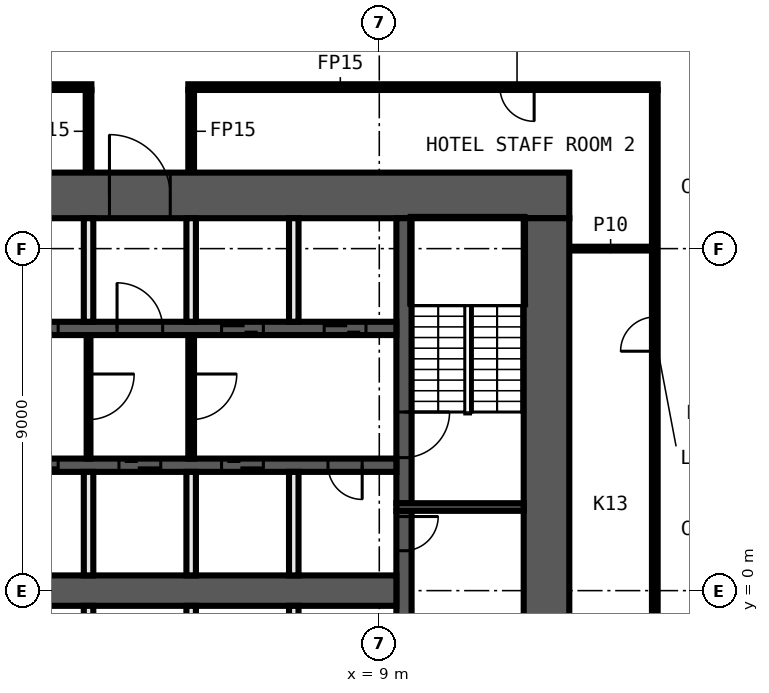
"""IFC4 building model, lengths in metres.
Left out: names, types, materials, properties, quantities, classifications, styles, units other than length and angle.
Written with IfcOpenShell. Run it as: python <this file> out.ifc"""

import sys

from ifc_helpers import new_model, si_unit, direction, frame, frame_2d, origin, place, context, subcontext, project, spatial, rectangle, extrude, element, fill, save


model = new_model("IFC4")
c1 = context("Model", 3, precision=1e-05, world=origin(), true_north=direction((0.0, 1.0)))
c2 = subcontext(c1, "Body", "Model", "MODEL_VIEW")
j1 = project(units=[si_unit("LENGTHUNIT", "METRE"), si_unit("PLANEANGLEUNIT", "RADIAN")], contexts=[c1])
p1 = place(None, origin())
s1 = spatial("IfcSite", under=j1, at=p1, CompositionType="ELEMENT")
p2 = place(p1, origin())
s2 = spatial("IfcBuilding", under=s1, at=p2, CompositionType="ELEMENT")
p3 = place(p2, frame((0.0, 0.0, 62.5)))
s3 = spatial("IfcBuildingStorey", under=s2, at=p3, CompositionType="ELEMENT", Elevation=62.5)
p4 = place(p3, frame((14.0, 9.0, 0.0), z_axis=(0.0, 0.0, 1.0), x_axis=(1.0, 0.0, 0.0)))
e1 = element("IfcWall", 1, at=p4, inside=s3, PredefinedType="PARTITIONING", context=c2, shape_type="SweptSolid", body=[
    extrude(rectangle(XDim=2.175, YDim=0.1, at=frame_2d((1.087, 0.0))), origin(), (0.0, 0.0, 1.0), 3.3),
])
p5 = place(p3, frame((1.425, 13.25, 0.0), z_axis=(0.0, 0.0, 1.0), x_axis=(-1.0, 0.0, 0.0)))
e2 = element("IfcWall", 2, at=p5, inside=s3, PredefinedType="PARTITIONING", context=c2, shape_type="SweptSolid", body=[
    extrude(rectangle(XDim=17.75, YDim=0.15, at=frame_2d((8.875, 0.0))), origin(), (0.0, 0.0, 1.0), 3.3),
])
p6 = place(p5, frame((7.725, 0.0, 0.0)))
e3 = element("IfcOpeningElement", 3, at=p6, cuts=e2, PredefinedType="OPENING", context=c2, shape_type="SweptSolid", body=[
    extrude(rectangle(XDim=0.9, YDim=2.1, at=frame_2d((0.45, 1.05))), frame((0.0, 0.085, 0.0), z_axis=(0.0, -1.0, 0.0), x_axis=(1.0, 0.0, 0.0)), (0.0, 0.0, 1.0), 0.17),
])
p7 = place(p5, frame((13.6, 0.0, 0.0)))
e4 = element("IfcOpeningElement", 4, at=p7, cuts=e2, PredefinedType="OPENING", context=c2, shape_type="SweptSolid", body=[
    extrude(rectangle(XDim=0.9, YDim=2.1, at=frame_2d((0.45, 1.05))), frame((0.0, 0.085, 0.0), z_axis=(0.0, -1.0, 0.0), x_axis=(1.0, 0.0, 0.0)), (0.0, 0.0, 1.0), 0.17),
])
p8 = place(p3, frame((16.325, 13.25, 0.0), z_axis=(0.0, 0.0, 1.0), x_axis=(-1.0, 0.0, 0.0)))
e5 = element("IfcWall", 5, at=p8, inside=s3, PredefinedType="PARTITIONING", context=c2, shape_type="SweptSolid", body=[
    extrude(rectangle(XDim=12.35, YDim=0.15, at=frame_2d((6.175, 0.0))), origin(), (0.0, 0.0, 1.0), 3.3),
])
p9 = place(p8, frame((3.25, 0.0, 0.0)))
e6 = element("IfcOpeningElement", 6, at=p9, cuts=e5, PredefinedType="OPENING", context=c2, shape_type="SweptSolid", body=[
    extrude(rectangle(XDim=0.9, YDim=2.1, at=frame_2d((0.45, 1.05))), frame((0.0, 0.085, 0.0), z_axis=(0.0, -1.0, 0.0), x_axis=(1.0, 0.0, 0.0)), (0.0, 0.0, 1.0), 0.17),
])
p10 = place(p3, frame((16.25, -13.175, 0.0), z_axis=(0.0, 0.0, 1.0), x_axis=(0.0, 1.0, 0.0)))
e7 = element("IfcWall", 7, at=p10, inside=s3, PredefinedType="PARTITIONING", context=c2, shape_type="SweptSolid", body=[
    extrude(rectangle(XDim=26.35, YDim=0.15, at=frame_2d((13.175, 0.0))), origin(), (0.0, 0.0, 1.0), 3.3),
])
p11 = place(p10, frame((19.475, 0.0, 0.0)))
e8 = element("IfcOpeningElement", 8, at=p11, cuts=e7, PredefinedType="OPENING", context=c2, shape_type="SweptSolid", body=[
    extrude(rectangle(XDim=0.9, YDim=2.1, at=frame_2d((0.45, 1.05))), frame((0.0, 0.085, 0.0), z_axis=(0.0, -1.0, 0.0), x_axis=(1.0, 0.0, 0.0)), (0.0, 0.0, 1.0), 0.17),
])
for number, where, z_axis, x_axis in (
    (9, (4.05, 11.0, 0.0), (0.0, 0.0, 1.0), (0.0, 1.0, 0.0)),
    (10, (1.35, 11.0, 0.0), (0.0, 0.0, 1.0), (0.0, 1.0, 0.0)),
):
    element("IfcWall", number, at=place(p3, frame(where, z_axis=z_axis, x_axis=x_axis)), inside=s3, PredefinedType="PARTITIONING", context=c2, shape_type="SweptSolid", body=[
        extrude(rectangle(XDim=2.175, YDim=0.15, at=frame_2d((1.087, 0.0))), origin(), (0.0, 0.0, 1.0), 3.3),
    ])
p12 = place(p3, frame((-14.0, 10.4, 0.0), z_axis=(0.0, 0.0, 1.0), x_axis=(1.0, 0.0, 0.0)))
e11 = element("IfcWall", 11, at=p12, inside=s3, PredefinedType="SHEAR", context=c2, shape_type="SweptSolid", body=[
    extrude(rectangle(XDim=28.0, YDim=1.2, at=frame_2d((14.0, 0.0))), origin(), (0.0, 0.0, 1.0), 3.3),
])
p13 = place(p12, frame((15.9, 0.0, 0.0)))
e12 = element("IfcOpeningElement", 12, at=p13, cuts=e11, PredefinedType="OPENING", context=c2, shape_type="SweptSolid", body=[
    extrude(rectangle(XDim=1.6, YDim=2.1, at=frame_2d((0.8, 1.05))), frame((0.0, 0.61, 0.0), z_axis=(0.0, -1.0, 0.0), x_axis=(1.0, 0.0, 0.0)), (0.0, 0.0, 1.0), 1.22),
])
p14 = place(p3, frame((13.4, 9.8, 0.0), z_axis=(0.0, 0.0, 1.0), x_axis=(0.0, -1.0, 0.0)))
e13 = element("IfcWall", 13, at=p14, inside=s3, PredefinedType="SHEAR", context=c2, shape_type="SweptSolid", body=[
    extrude(rectangle(XDim=19.6, YDim=1.2, at=frame_2d((9.8, 0.0))), origin(), (0.0, 0.0, 1.0), 3.3),
])
p15 = place(p3, frame((9.65, 2.1, 0.0), z_axis=(0.0, 0.0, 1.0), x_axis=(0.0, -1.0, 0.0)))
e14 = element("IfcWall", 14, at=p15, inside=s3, PredefinedType="SHEAR", context=c2, shape_type="SweptSolid", body=[
    extrude(rectangle(XDim=4.2, YDim=0.4, at=frame_2d((2.1, 0.0))), origin(), (0.0, 0.0, 1.0), 3.3),
])
p16 = place(p15, frame((0.15, 0.0, 0.0)))
e15 = element("IfcOpeningElement", 15, at=p16, cuts=e14, PredefinedType="OPENING", context=c2, shape_type="SweptSolid", body=[
    extrude(rectangle(XDim=0.9, YDim=2.1, at=frame_2d((0.45, 1.05))), frame((0.0, 0.21, 0.0), z_axis=(0.0, -1.0, 0.0), x_axis=(1.0, 0.0, 0.0)), (0.0, 0.0, 1.0), 0.42),
])
p17 = place(p3, frame((9.65, 9.8, 0.0), z_axis=(0.0, 0.0, 1.0), x_axis=(0.0, -1.0, 0.0)))
e16 = element("IfcWall", 16, at=p17, inside=s3, PredefinedType="SHEAR", context=c2, shape_type="SweptSolid", body=[
    extrude(rectangle(XDim=7.5, YDim=0.4, at=frame_2d((3.75, 0.0))), origin(), (0.0, 0.0, 1.0), 3.3),
])
p18 = place(p17, frame((5.1, 0.0, 0.0)))
e17 = element("IfcOpeningElement", 17, at=p18, cuts=e16, PredefinedType="OPENING", context=c2, shape_type="SweptSolid", body=[
    extrude(rectangle(XDim=1.2, YDim=2.1, at=frame_2d((0.6, 1.05))), frame((0.0, 0.21, 0.0), z_axis=(0.0, -1.0, 0.0), x_axis=(1.0, 0.0, 0.0)), (0.0, 0.0, 1.0), 0.42),
])
p19 = place(p3, frame((9.45, 2.2, 0.0), z_axis=(0.0, 0.0, 1.0), x_axis=(1.0, 0.0, 0.0)))
e18 = element("IfcWall", 18, at=p19, inside=s3, PredefinedType="SHEAR", context=c2, shape_type="SweptSolid", body=[
    extrude(rectangle(XDim=3.35, YDim=0.2, at=frame_2d((1.675, 0.0))), origin(), (0.0, 0.0, 1.0), 3.3),
])
p20 = place(p3, frame((-9.45, 6.9, 0.0), z_axis=(0.0, 0.0, 1.0), x_axis=(1.0, 0.0, 0.0)))
e19 = element("IfcWall", 19, at=p20, inside=s3, PredefinedType="SHEAR", context=c2, shape_type="SweptSolid", body=[
    extrude(rectangle(XDim=18.9, YDim=0.35, at=frame_2d((9.45, 0.0))), origin(), (0.0, 0.0, 1.0), 3.3),
])
p21 = place(p20, frame((0.8, 0.0, 0.0)))
e20 = element("IfcOpeningElement", 20, at=p21, cuts=e19, PredefinedType="OPENING", context=c2, shape_type="SweptSolid", body=[
    extrude(rectangle(XDim=1.1, YDim=2.1, at=frame_2d((0.55, 1.05))), frame((0.0, 0.185, 0.0), z_axis=(0.0, -1.0, 0.0), x_axis=(1.0, 0.0, 0.0)), (0.0, 0.0, 1.0), 0.37),
])
p22 = place(p20, frame((3.5, 0.0, 0.0)))
e21 = element("IfcOpeningElement", 21, at=p22, cuts=e19, PredefinedType="OPENING", context=c2, shape_type="SweptSolid", body=[
    extrude(rectangle(XDim=1.1, YDim=2.1, at=frame_2d((0.55, 1.05))), frame((0.0, 0.185, 0.0), z_axis=(0.0, -1.0, 0.0), x_axis=(1.0, 0.0, 0.0)), (0.0, 0.0, 1.0), 0.37),
])
p23 = place(p20, frame((6.2, 0.0, 0.0)))
e22 = element("IfcOpeningElement", 22, at=p23, cuts=e19, PredefinedType="OPENING", context=c2, shape_type="SweptSolid", body=[
    extrude(rectangle(XDim=1.1, YDim=2.1, at=frame_2d((0.55, 1.05))), frame((0.0, 0.185, 0.0), z_axis=(0.0, -1.0, 0.0), x_axis=(1.0, 0.0, 0.0)), (0.0, 0.0, 1.0), 0.37),
])
p24 = place(p20, frame((8.9, 0.0, 0.0)))
e23 = element("IfcOpeningElement", 23, at=p24, cuts=e19, PredefinedType="OPENING", context=c2, shape_type="SweptSolid", body=[
    extrude(rectangle(XDim=1.1, YDim=2.1, at=frame_2d((0.55, 1.05))), frame((0.0, 0.185, 0.0), z_axis=(0.0, -1.0, 0.0), x_axis=(1.0, 0.0, 0.0)), (0.0, 0.0, 1.0), 0.37),
])
p25 = place(p20, frame((11.55, 0.0, 0.0)))
e24 = element("IfcOpeningElement", 24, at=p25, cuts=e19, PredefinedType="OPENING", context=c2, shape_type="SweptSolid", body=[
    extrude(rectangle(XDim=1.2, YDim=2.1, at=frame_2d((0.6, 1.05))), frame((0.0, 0.185, 0.0), z_axis=(0.0, -1.0, 0.0), x_axis=(1.0, 0.0, 0.0)), (0.0, 0.0, 1.0), 0.37),
])
p26 = place(p20, frame((14.3, 0.0, 0.0)))
e25 = element("IfcOpeningElement", 25, at=p26, cuts=e19, PredefinedType="OPENING", context=c2, shape_type="SweptSolid", body=[
    extrude(rectangle(XDim=1.1, YDim=2.1, at=frame_2d((0.55, 1.05))), frame((0.0, 0.185, 0.0), z_axis=(0.0, -1.0, 0.0), x_axis=(1.0, 0.0, 0.0)), (0.0, 0.0, 1.0), 0.37),
])
p27 = place(p20, frame((17.0, 0.0, 0.0)))
e26 = element("IfcOpeningElement", 26, at=p27, cuts=e19, PredefinedType="OPENING", context=c2, shape_type="SweptSolid", body=[
    extrude(rectangle(XDim=1.1, YDim=2.1, at=frame_2d((0.55, 1.05))), frame((0.0, 0.185, 0.0), z_axis=(0.0, -1.0, 0.0), x_axis=(1.0, 0.0, 0.0)), (0.0, 0.0, 1.0), 0.37),
])
p28 = place(p3, frame((9.45, 3.3, 0.0), z_axis=(0.0, 0.0, 1.0), x_axis=(-1.0, 0.0, 0.0)))
e27 = element("IfcWall", 27, at=p28, inside=s3, PredefinedType="SHEAR", context=c2, shape_type="SweptSolid", body=[
    extrude(rectangle(XDim=18.9, YDim=0.35, at=frame_2d((9.45, 0.0))), origin(), (0.0, 0.0, 1.0), 3.3),
])
p29 = place(p28, frame((17.0, 0.0, 0.0)))
e28 = element("IfcOpeningElement", 28, at=p29, cuts=e27, PredefinedType="OPENING", context=c2, shape_type="SweptSolid", body=[
    extrude(rectangle(XDim=1.1, YDim=2.1, at=frame_2d((0.55, 1.05))), frame((0.0, 0.185, 0.0), z_axis=(0.0, -1.0, 0.0), x_axis=(1.0, 0.0, 0.0)), (0.0, 0.0, 1.0), 0.37),
])
p30 = place(p28, frame((14.3, 0.0, 0.0)))
e29 = element("IfcOpeningElement", 29, at=p30, cuts=e27, PredefinedType="OPENING", context=c2, shape_type="SweptSolid", body=[
    extrude(rectangle(XDim=1.1, YDim=2.1, at=frame_2d((0.55, 1.05))), frame((0.0, 0.185, 0.0), z_axis=(0.0, -1.0, 0.0), x_axis=(1.0, 0.0, 0.0)), (0.0, 0.0, 1.0), 0.37),
])
p31 = place(p28, frame((11.6, 0.0, 0.0)))
e30 = element("IfcOpeningElement", 30, at=p31, cuts=e27, PredefinedType="OPENING", context=c2, shape_type="SweptSolid", body=[
    extrude(rectangle(XDim=1.1, YDim=2.1, at=frame_2d((0.55, 1.05))), frame((0.0, 0.185, 0.0), z_axis=(0.0, -1.0, 0.0), x_axis=(1.0, 0.0, 0.0)), (0.0, 0.0, 1.0), 0.37),
])
p32 = place(p28, frame((8.9, 0.0, 0.0)))
e31 = element("IfcOpeningElement", 31, at=p32, cuts=e27, PredefinedType="OPENING", context=c2, shape_type="SweptSolid", body=[
    extrude(rectangle(XDim=1.1, YDim=2.1, at=frame_2d((0.55, 1.05))), frame((0.0, 0.185, 0.0), z_axis=(0.0, -1.0, 0.0), x_axis=(1.0, 0.0, 0.0)), (0.0, 0.0, 1.0), 0.37),
])
p33 = place(p28, frame((6.2, 0.0, 0.0)))
e32 = element("IfcOpeningElement", 32, at=p33, cuts=e27, PredefinedType="OPENING", context=c2, shape_type="SweptSolid", body=[
    extrude(rectangle(XDim=1.1, YDim=2.1, at=frame_2d((0.55, 1.05))), frame((0.0, 0.185, 0.0), z_axis=(0.0, -1.0, 0.0), x_axis=(1.0, 0.0, 0.0)), (0.0, 0.0, 1.0), 0.37),
])
p34 = place(p28, frame((3.5, 0.0, 0.0)))
e33 = element("IfcOpeningElement", 33, at=p34, cuts=e27, PredefinedType="OPENING", context=c2, shape_type="SweptSolid", body=[
    extrude(rectangle(XDim=1.1, YDim=2.1, at=frame_2d((0.55, 1.05))), frame((0.0, 0.185, 0.0), z_axis=(0.0, -1.0, 0.0), x_axis=(1.0, 0.0, 0.0)), (0.0, 0.0, 1.0), 0.37),
])
p35 = place(p28, frame((0.9, 0.0, 0.0)))
e34 = element("IfcOpeningElement", 34, at=p35, cuts=e27, PredefinedType="OPENING", context=c2, shape_type="SweptSolid", body=[
    extrude(rectangle(XDim=0.9, YDim=2.1, at=frame_2d((0.45, 1.05))), frame((0.0, 0.185, 0.0), z_axis=(0.0, -1.0, 0.0), x_axis=(1.0, 0.0, 0.0)), (0.0, 0.0, 1.0), 0.37),
])
p36 = place(p3, frame((-9.45, 0.0, 0.0), z_axis=(0.0, 0.0, 1.0), x_axis=(1.0, 0.0, 0.0)))
e35 = element("IfcWall", 35, at=p36, inside=s3, PredefinedType="SHEAR", context=c2, shape_type="SweptSolid", body=[
    extrude(rectangle(XDim=18.9, YDim=0.8, at=frame_2d((9.45, 0.0))), origin(), (0.0, 0.0, 1.0), 3.3),
])
for number, where, z_axis, x_axis in (
    (36, (6.75, -3.125, 0.0), (0.0, 0.0, 1.0), (0.0, 1.0, 0.0)),
    (37, (6.75, 0.4, 0.0), (0.0, 0.0, 1.0), (0.0, 1.0, 0.0)),
    (38, (6.75, 7.075, 0.0), (0.0, 0.0, 1.0), (0.0, 1.0, 0.0)),
):
    element("IfcWall", number, at=place(p3, frame(where, z_axis=z_axis, x_axis=x_axis)), inside=s3, PredefinedType="SOLIDWALL", context=c2, shape_type="SweptSolid", body=[
        extrude(rectangle(XDim=2.725, YDim=0.25, at=frame_2d((1.363, 0.0))), origin(), (0.0, 0.0, 1.0), 3.3),
    ])
p37 = place(p3, frame((4.05, 6.725, 0.0), z_axis=(0.0, 0.0, 1.0), x_axis=(0.0, -1.0, 0.0)))
e39 = element("IfcWall", 39, at=p37, inside=s3, PredefinedType="PARTITIONING", context=c2, shape_type="SweptSolid", body=[
    extrude(rectangle(XDim=3.25, YDim=0.15, at=frame_2d((1.625, 0.0))), origin(), (0.0, 0.0, 1.0), 3.3),
])
p38 = place(p37, frame((1.025, 0.0, 0.0)))
e40 = element("IfcOpeningElement", 40, at=p38, cuts=e39, PredefinedType="OPENING", context=c2, shape_type="SweptSolid", body=[
    extrude(rectangle(XDim=1.2, YDim=2.1, at=frame_2d((0.6, 1.05))), frame((0.0, 0.085, 0.0), z_axis=(0.0, -1.0, 0.0), x_axis=(1.0, 0.0, 0.0)), (0.0, 0.0, 1.0), 0.17),
])
for number, where, z_axis, x_axis in (
    (41, (4.05, -3.125, 0.0), (0.0, 0.0, 1.0), (0.0, 1.0, 0.0)),
    (42, (4.05, 0.4, 0.0), (0.0, 0.0, 1.0), (0.0, 1.0, 0.0)),
    (43, (4.05, 7.075, 0.0), (0.0, 0.0, 1.0), (0.0, 1.0, 0.0)),
):
    element("IfcWall", number, at=place(p3, frame(where, z_axis=z_axis, x_axis=x_axis)), inside=s3, PredefinedType="SOLIDWALL", context=c2, shape_type="SweptSolid", body=[
        extrude(rectangle(XDim=2.725, YDim=0.25, at=frame_2d((1.363, 0.0))), origin(), (0.0, 0.0, 1.0), 3.3),
    ])
p39 = place(p3, frame((1.35, 6.725, 0.0), z_axis=(0.0, 0.0, 1.0), x_axis=(0.0, -1.0, 0.0)))
e44 = element("IfcWall", 44, at=p39, inside=s3, PredefinedType="PARTITIONING", context=c2, shape_type="SweptSolid", body=[
    extrude(rectangle(XDim=3.25, YDim=0.1, at=frame_2d((1.625, 0.0))), origin(), (0.0, 0.0, 1.0), 3.3),
])
p40 = place(p39, frame((1.025, 0.0, 0.0)))
e45 = element("IfcOpeningElement", 45, at=p40, cuts=e44, PredefinedType="OPENING", context=c2, shape_type="SweptSolid", body=[
    extrude(rectangle(XDim=1.2, YDim=2.1, at=frame_2d((0.6, 1.05))), frame((0.0, 0.06, 0.0), z_axis=(0.0, -1.0, 0.0), x_axis=(1.0, 0.0, 0.0)), (0.0, 0.0, 1.0), 0.12),
])
for number, where, z_axis, x_axis in (
    (46, (1.35, -3.125, 0.0), (0.0, 0.0, 1.0), (0.0, 1.0, 0.0)),
    (47, (1.35, 0.4, 0.0), (0.0, 0.0, 1.0), (0.0, 1.0, 0.0)),
    (48, (1.35, 7.075, 0.0), (0.0, 0.0, 1.0), (0.0, 1.0, 0.0)),
):
    element("IfcWall", number, at=place(p3, frame(where, z_axis=z_axis, x_axis=x_axis)), inside=s3, PredefinedType="SOLIDWALL", context=c2, shape_type="SweptSolid", body=[
        extrude(rectangle(XDim=2.725, YDim=0.25, at=frame_2d((1.363, 0.0))), origin(), (0.0, 0.0, 1.0), 3.3),
    ])
p41 = place(p11, origin())
e49 = element("IfcDoor", 49, at=p41, inside=s3, OperationType="SINGLE_SWING_RIGHT", PredefinedType="DOOR", context=c2, shape_type="SweptSolid", body=[
    extrude(rectangle(XDim=0.9, YDim=2.1, at=frame_2d((0.45, 1.05))), frame((0.0, 0.025, 0.0), z_axis=(0.0, -1.0, 0.0), x_axis=(1.0, 0.0, 0.0)), (0.0, 0.0, 1.0), 0.05),
])
fill(e8, e49)
p42 = place(p9, origin())
e50 = element("IfcDoor", 50, at=p42, inside=s3, OperationType="SINGLE_SWING_LEFT", PredefinedType="DOOR", context=c2, shape_type="SweptSolid", body=[
    extrude(rectangle(XDim=0.9, YDim=2.1, at=frame_2d((0.45, 1.05))), frame((0.0, 0.025, 0.0), z_axis=(0.0, -1.0, 0.0), x_axis=(1.0, 0.0, 0.0)), (0.0, 0.0, 1.0), 0.05),
])
fill(e6, e50)
p43 = place(p16, origin())
e51 = element("IfcDoor", 51, at=p43, inside=s3, OperationType="SINGLE_SWING_RIGHT", PredefinedType="DOOR", context=c2, shape_type="SweptSolid", body=[
    extrude(rectangle(XDim=0.9, YDim=2.1, at=frame_2d((0.45, 1.05))), frame((0.0, 0.025, 0.0), z_axis=(0.0, -1.0, 0.0), x_axis=(1.0, 0.0, 0.0)), (0.0, 0.0, 1.0), 0.05),
])
fill(e15, e51)
p44 = place(p24, origin())
e52 = element("IfcDoor", 52, at=p44, inside=s3, OperationType="DOUBLE_DOOR_SLIDING", PredefinedType="DOOR", context=c2, shape_type="SweptSolid", body=[
    extrude(rectangle(XDim=1.1, YDim=2.1, at=frame_2d((0.55, 1.05))), frame((0.0, 0.025, 0.0), z_axis=(0.0, -1.0, 0.0), x_axis=(1.0, 0.0, 0.0)), (0.0, 0.0, 1.0), 0.05),
])
fill(e23, e52)
p45 = place(p13, origin())
e53 = element("IfcDoor", 53, at=p45, inside=s3, OperationType="DOUBLE_DOOR_SINGLE_SWING", PredefinedType="DOOR", context=c2, shape_type="SweptSolid", body=[
    extrude(rectangle(XDim=1.6, YDim=2.1, at=frame_2d((0.8, 1.05))), frame((0.0, 0.025, 0.0), z_axis=(0.0, -1.0, 0.0), x_axis=(1.0, 0.0, 0.0)), (0.0, 0.0, 1.0), 0.05),
])
fill(e12, e53)
p46 = place(p25, origin())
e54 = element("IfcDoor", 54, at=p46, inside=s3, OperationType="SINGLE_SWING_LEFT", PredefinedType="DOOR", context=c2, shape_type="SweptSolid", body=[
    extrude(rectangle(XDim=1.2, YDim=2.1, at=frame_2d((0.6, 1.05))), frame((0.0, 0.025, 0.0), z_axis=(0.0, -1.0, 0.0), x_axis=(1.0, 0.0, 0.0)), (0.0, 0.0, 1.0), 0.05),
])
fill(e24, e54)
p47 = place(p26, origin())
e55 = element("IfcDoor", 55, at=p47, inside=s3, OperationType="DOUBLE_DOOR_SLIDING", PredefinedType="DOOR", context=c2, shape_type="SweptSolid", body=[
    extrude(rectangle(XDim=1.1, YDim=2.1, at=frame_2d((0.55, 1.05))), frame((0.0, 0.025, 0.0), z_axis=(0.0, -1.0, 0.0), x_axis=(1.0, 0.0, 0.0)), (0.0, 0.0, 1.0), 0.05),
])
fill(e25, e55)
p48 = place(p27, origin())
e56 = element("IfcDoor", 56, at=p48, inside=s3, OperationType="DOUBLE_DOOR_SLIDING", PredefinedType="DOOR", context=c2, shape_type="SweptSolid", body=[
    extrude(rectangle(XDim=1.1, YDim=2.1, at=frame_2d((0.55, 1.05))), frame((0.0, 0.025, 0.0), z_axis=(0.0, -1.0, 0.0), x_axis=(1.0, 0.0, 0.0)), (0.0, 0.0, 1.0), 0.05),
])
fill(e26, e56)
p49 = place(p32, origin())
e57 = element("IfcDoor", 57, at=p49, inside=s3, OperationType="DOUBLE_DOOR_SLIDING", PredefinedType="DOOR", context=c2, shape_type="SweptSolid", body=[
    extrude(rectangle(XDim=1.1, YDim=2.1, at=frame_2d((0.55, 1.05))), frame((0.0, 0.025, 0.0), z_axis=(0.0, -1.0, 0.0), x_axis=(1.0, 0.0, 0.0)), (0.0, 0.0, 1.0), 0.05),
])
fill(e31, e57)
p50 = place(p33, origin())
e58 = element("IfcDoor", 58, at=p50, inside=s3, OperationType="DOUBLE_DOOR_SLIDING", PredefinedType="DOOR", context=c2, shape_type="SweptSolid", body=[
    extrude(rectangle(XDim=1.1, YDim=2.1, at=frame_2d((0.55, 1.05))), frame((0.0, 0.025, 0.0), z_axis=(0.0, -1.0, 0.0), x_axis=(1.0, 0.0, 0.0)), (0.0, 0.0, 1.0), 0.05),
])
fill(e32, e58)
p51 = place(p34, origin())
e59 = element("IfcDoor", 59, at=p51, inside=s3, OperationType="DOUBLE_DOOR_SLIDING", PredefinedType="DOOR", context=c2, shape_type="SweptSolid", body=[
    extrude(rectangle(XDim=1.1, YDim=2.1, at=frame_2d((0.55, 1.05))), frame((0.0, 0.025, 0.0), z_axis=(0.0, -1.0, 0.0), x_axis=(1.0, 0.0, 0.0)), (0.0, 0.0, 1.0), 0.05),
])
fill(e33, e59)
p52 = place(p35, origin())
e60 = element("IfcDoor", 60, at=p52, inside=s3, OperationType="SINGLE_SWING_LEFT", PredefinedType="DOOR", context=c2, shape_type="SweptSolid", body=[
    extrude(rectangle(XDim=0.9, YDim=2.1, at=frame_2d((0.45, 1.05))), frame((0.0, 0.025, 0.0), z_axis=(0.0, -1.0, 0.0), x_axis=(1.0, 0.0, 0.0)), (0.0, 0.0, 1.0), 0.05),
])
fill(e34, e60)
p53 = place(p18, origin())
e61 = element("IfcDoor", 61, at=p53, inside=s3, OperationType="SINGLE_SWING_LEFT", PredefinedType="DOOR", context=c2, shape_type="SweptSolid", body=[
    extrude(rectangle(XDim=1.2, YDim=2.1, at=frame_2d((0.6, 1.05))), frame((0.0, 0.025, 0.0), z_axis=(0.0, -1.0, 0.0), x_axis=(1.0, 0.0, 0.0)), (0.0, 0.0, 1.0), 0.05),
])
fill(e17, e61)
p54 = place(p40, origin())
e62 = element("IfcDoor", 62, at=p54, inside=s3, OperationType="SINGLE_SWING_LEFT", PredefinedType="DOOR", context=c2, shape_type="SweptSolid", body=[
    extrude(rectangle(XDim=1.2, YDim=2.1, at=frame_2d((0.6, 1.05))), frame((0.0, 0.025, 0.0), z_axis=(0.0, -1.0, 0.0), x_axis=(1.0, 0.0, 0.0)), (0.0, 0.0, 1.0), 0.05),
])
fill(e45, e62)
p55 = place(p38, origin())
e63 = element("IfcDoor", 63, at=p55, inside=s3, OperationType="SINGLE_SWING_RIGHT", PredefinedType="DOOR", context=c2, shape_type="SweptSolid", body=[
    extrude(rectangle(XDim=1.2, YDim=2.1, at=frame_2d((0.6, 1.05))), frame((0.0, 0.025, 0.0), z_axis=(0.0, -1.0, 0.0), x_axis=(1.0, 0.0, 0.0)), (0.0, 0.0, 1.0), 0.05),
])
fill(e40, e63)
save(model, sys.argv[1])
